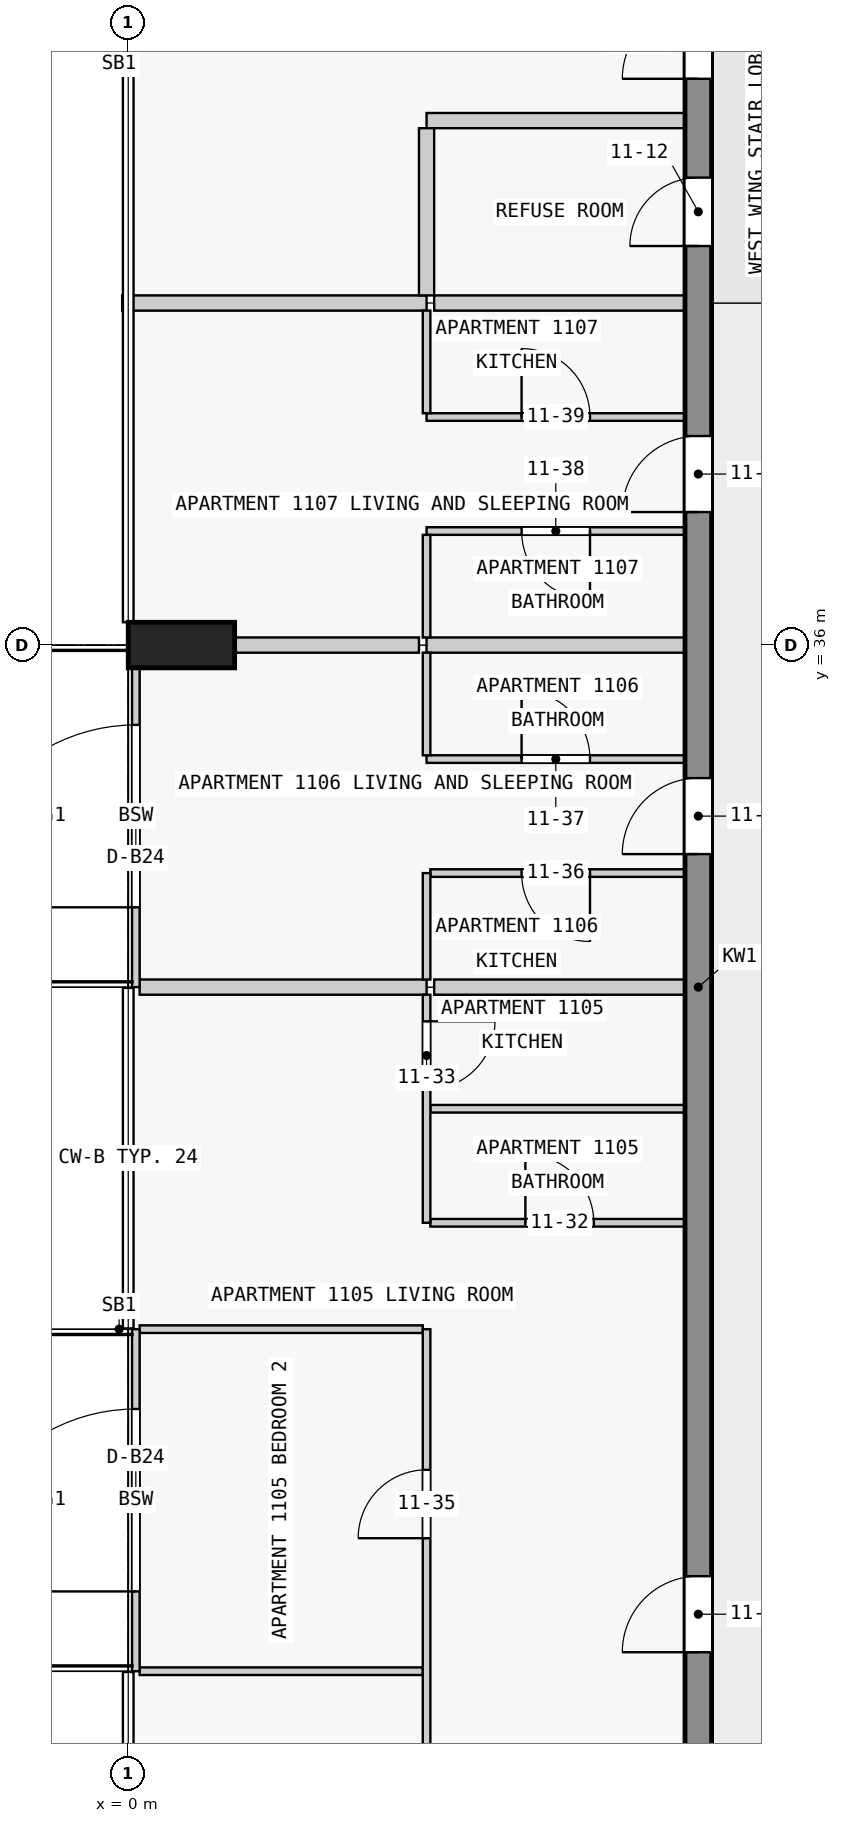
"""IFC4 building model, lengths in metres.
Left out: names, types, materials, properties, quantities, classifications, styles, units other than length and angle.
Written with IfcOpenShell. Run it as: python <this file> out.ifc"""

import sys

from ifc_helpers import new_model, si_unit, direction, frame, frame_2d, origin, origin_2d, place, context, subcontext, project, spatial, rectangle, extrude, element, fill, save


model = new_model("IFC4")
c1 = context("Model", 3, precision=1e-05, world=origin(), true_north=direction((0.0, 1.0)))
c2 = subcontext(c1, "Body", "Model", "MODEL_VIEW")
j1 = project(units=[si_unit("LENGTHUNIT", "METRE"), si_unit("PLANEANGLEUNIT", "RADIAN")], contexts=[c1])
p1 = place(None, origin())
s1 = spatial("IfcSite", under=j1, at=p1, CompositionType="ELEMENT")
p2 = place(p1, origin())
s2 = spatial("IfcBuilding", under=s1, at=p2, CompositionType="ELEMENT")
p3 = place(p2, frame((0.0, 0.0, 47.8)))
s3 = spatial("IfcBuildingStorey", under=s2, at=p3, CompositionType="ELEMENT", Elevation=47.8)
p4 = place(p3, frame((0.7, 36.0, 0.0), z_axis=(0.0, 0.0, 1.0), x_axis=(0.0, 1.0, 0.0)))
e1 = element("IfcColumn", 1, at=p4, inside=s3, PredefinedType="COLUMN", context=c2, shape_type="SweptSolid", body=[
    extrude(rectangle(XDim=0.6, YDim=1.4, at=origin_2d()), origin(), (0.0, 0.0, 1.0), 3.5),
])
p5 = place(p3, frame((7.5, 18.0, 0.0), z_axis=(0.0, 0.0, 1.0), x_axis=(0.0, 1.0, 0.0)))
e2 = element("IfcWall", 2, at=p5, inside=s3, PredefinedType="SHEAR", context=c2, shape_type="SweptSolid", body=[
    extrude(rectangle(XDim=27.0, YDim=0.35, at=frame_2d((13.5, 0.0))), origin(), (0.0, 0.0, 1.0), 3.25),
])
p6 = place(p5, frame((4.75, 0.0, 0.0)))
e3 = element("IfcOpeningElement", 3, at=p6, cuts=e2, PredefinedType="OPENING", context=c2, shape_type="SweptSolid", body=[
    extrude(rectangle(XDim=1.0, YDim=2.1, at=frame_2d((0.5, 1.05))), frame((0.0, 0.185, 0.0), z_axis=(0.0, -1.0, 0.0), x_axis=(1.0, 0.0, 0.0)), (0.0, 0.0, 1.0), 0.37),
])
p7 = place(p5, frame((15.25, 0.0, 0.0)))
e4 = element("IfcOpeningElement", 4, at=p7, cuts=e2, PredefinedType="OPENING", context=c2, shape_type="SweptSolid", body=[
    extrude(rectangle(XDim=1.0, YDim=2.1, at=frame_2d((0.5, 1.05))), frame((0.0, 0.185, 0.0), z_axis=(0.0, -1.0, 0.0), x_axis=(1.0, 0.0, 0.0)), (0.0, 0.0, 1.0), 0.37),
])
p8 = place(p5, frame((19.75, 0.0, 0.0)))
e5 = element("IfcOpeningElement", 5, at=p8, cuts=e2, PredefinedType="OPENING", context=c2, shape_type="SweptSolid", body=[
    extrude(rectangle(XDim=1.0, YDim=2.1, at=frame_2d((0.5, 1.05))), frame((0.0, 0.185, 0.0), z_axis=(0.0, -1.0, 0.0), x_axis=(1.0, 0.0, 0.0)), (0.0, 0.0, 1.0), 0.37),
])
p9 = place(p5, frame((23.25, 0.0, 0.0)))
e6 = element("IfcOpeningElement", 6, at=p9, cuts=e2, PredefinedType="OPENING", context=c2, shape_type="SweptSolid", body=[
    extrude(rectangle(XDim=0.9, YDim=2.1, at=frame_2d((0.45, 1.05))), frame((0.0, 0.185, 0.0), z_axis=(0.0, -1.0, 0.0), x_axis=(1.0, 0.0, 0.0)), (0.0, 0.0, 1.0), 0.37),
])
p10 = place(p5, frame((25.45, 0.0, 0.0)))
e7 = element("IfcOpeningElement", 7, at=p10, cuts=e2, PredefinedType="OPENING", context=c2, shape_type="SweptSolid", body=[
    extrude(rectangle(XDim=1.0, YDim=2.1, at=frame_2d((0.5, 1.05))), frame((0.0, 0.185, 0.0), z_axis=(0.0, -1.0, 0.0), x_axis=(1.0, 0.0, 0.0)), (0.0, 0.0, 1.0), 0.37),
])
p11 = place(p3, frame((0.1, 22.5, 0.0), z_axis=(0.0, 0.0, 1.0), x_axis=(0.0, 1.0, 0.0)))
e8 = element("IfcWall", 8, at=p11, inside=s3, PredefinedType="STANDARD", context=c2, shape_type="SweptSolid", body=[
    extrude(rectangle(XDim=4.5, YDim=0.1, at=frame_2d((2.25, 0.0))), origin(), (0.0, 0.0, 1.0), 3.25),
])
p12 = place(p11, frame((1.05, 0.0, 0.0)))
e9 = element("IfcOpeningElement", 9, at=p12, cuts=e8, PredefinedType="OPENING", context=c2, shape_type="SweptSolid", body=[
    extrude(rectangle(XDim=2.4, YDim=2.4, at=frame_2d((1.2, 1.2))), frame((0.0, 0.06, 0.0), z_axis=(0.0, -1.0, 0.0), x_axis=(1.0, 0.0, 0.0)), (0.0, 0.0, 1.0), 0.12),
])
p13 = place(p3, frame((0.1, 31.5, 0.0), z_axis=(0.0, 0.0, 1.0), x_axis=(0.0, 1.0, 0.0)))
e10 = element("IfcWall", 10, at=p13, inside=s3, PredefinedType="STANDARD", context=c2, shape_type="SweptSolid", body=[
    extrude(rectangle(XDim=4.5, YDim=0.1, at=frame_2d((2.25, 0.0))), origin(), (0.0, 0.0, 1.0), 3.25),
])
p14 = place(p13, frame((1.05, 0.0, 0.0)))
e11 = element("IfcOpeningElement", 11, at=p14, cuts=e10, PredefinedType="OPENING", context=c2, shape_type="SweptSolid", body=[
    extrude(rectangle(XDim=2.4, YDim=2.4, at=frame_2d((1.2, 1.2))), frame((0.0, 0.06, 0.0), z_axis=(0.0, -1.0, 0.0), x_axis=(1.0, 0.0, 0.0)), (0.0, 0.0, 1.0), 0.12),
])
for number, where, z_axis, x_axis in (
    (12, (3.875, 22.5, 0.0), (0.0, 0.0, 1.0), (-1.0, 0.0, 0.0)),
    (13, (3.875, 27.0, 0.0), (0.0, 0.0, 1.0), (-1.0, 0.0, 0.0)),
):
    element("IfcWall", number, at=place(p3, frame(where, z_axis=z_axis, x_axis=x_axis)), inside=s3, PredefinedType="PARTITIONING", context=c2, shape_type="SweptSolid", body=[
        extrude(rectangle(XDim=3.725, YDim=0.1, at=frame_2d((1.863, 0.0))), origin(), (0.0, 0.0, 1.0), 3.25),
    ])
p15 = place(p3, frame((3.975, 28.4, 0.0), z_axis=(0.0, 0.0, 1.0), x_axis=(1.0, 0.0, 0.0)))
e14 = element("IfcWall", 14, at=p15, inside=s3, PredefinedType="PARTITIONING", context=c2, shape_type="SweptSolid", body=[
    extrude(rectangle(XDim=3.35, YDim=0.1, at=frame_2d((1.675, 0.0))), origin(), (0.0, 0.0, 1.0), 3.25),
])
p16 = place(p15, frame((1.25, 0.0, 0.0)))
e15 = element("IfcOpeningElement", 15, at=p16, cuts=e14, PredefinedType="OPENING", context=c2, shape_type="SweptSolid", body=[
    extrude(rectangle(XDim=0.9, YDim=2.1, at=frame_2d((0.45, 1.05))), frame((0.0, 0.06, 0.0), z_axis=(0.0, -1.0, 0.0), x_axis=(1.0, 0.0, 0.0)), (0.0, 0.0, 1.0), 0.12),
])
p17 = place(p3, frame((7.325, 29.9, 0.0), z_axis=(0.0, 0.0, 1.0), x_axis=(-1.0, 0.0, 0.0)))
e16 = element("IfcWall", 16, at=p17, inside=s3, PredefinedType="PARTITIONING", context=c2, shape_type="SweptSolid", body=[
    extrude(rectangle(XDim=3.35, YDim=0.1, at=frame_2d((1.675, 0.0))), origin(), (0.0, 0.0, 1.0), 3.25),
])
p18 = place(p3, frame((7.325, 31.5, 0.0), z_axis=(0.0, 0.0, 1.0), x_axis=(-1.0, 0.0, 0.0)))
e17 = element("IfcWall", 17, at=p18, inside=s3, PredefinedType="PARTITIONING", context=c2, shape_type="SweptSolid", body=[
    extrude(rectangle(XDim=3.3, YDim=0.2, at=frame_2d((1.65, 0.0))), origin(), (0.0, 0.0, 1.0), 3.25),
])
p19 = place(p3, frame((0.15, 31.5, 0.0), z_axis=(0.0, 0.0, 1.0), x_axis=(1.0, 0.0, 0.0)))
e18 = element("IfcWall", 18, at=p19, inside=s3, PredefinedType="PARTITIONING", context=c2, shape_type="SweptSolid", body=[
    extrude(rectangle(XDim=3.775, YDim=0.2, at=frame_2d((1.888, 0.0))), origin(), (0.0, 0.0, 1.0), 3.25),
])
p20 = place(p3, frame((7.325, 33.0, 0.0), z_axis=(0.0, 0.0, 1.0), x_axis=(-1.0, 0.0, 0.0)))
e19 = element("IfcWall", 19, at=p20, inside=s3, PredefinedType="PARTITIONING", context=c2, shape_type="SweptSolid", body=[
    extrude(rectangle(XDim=3.35, YDim=0.1, at=frame_2d((1.675, 0.0))), origin(), (0.0, 0.0, 1.0), 3.25),
])
p21 = place(p20, frame((1.25, 0.0, 0.0)))
e20 = element("IfcOpeningElement", 20, at=p21, cuts=e19, PredefinedType="OPENING", context=c2, shape_type="SweptSolid", body=[
    extrude(rectangle(XDim=0.9, YDim=2.1, at=frame_2d((0.45, 1.05))), frame((0.0, 0.06, 0.0), z_axis=(0.0, -1.0, 0.0), x_axis=(1.0, 0.0, 0.0)), (0.0, 0.0, 1.0), 0.12),
])
p22 = place(p3, frame((3.925, 34.5, 0.0), z_axis=(0.0, 0.0, 1.0), x_axis=(1.0, 0.0, 0.0)))
e21 = element("IfcWall", 21, at=p22, inside=s3, PredefinedType="PARTITIONING", context=c2, shape_type="SweptSolid", body=[
    extrude(rectangle(XDim=3.4, YDim=0.1, at=frame_2d((1.7, 0.0))), origin(), (0.0, 0.0, 1.0), 3.25),
])
p23 = place(p22, frame((1.25, 0.0, 0.0)))
e22 = element("IfcOpeningElement", 22, at=p23, cuts=e21, PredefinedType="OPENING", context=c2, shape_type="SweptSolid", body=[
    extrude(rectangle(XDim=0.9, YDim=2.1, at=frame_2d((0.45, 1.05))), frame((0.0, 0.06, 0.0), z_axis=(0.0, -1.0, 0.0), x_axis=(1.0, 0.0, 0.0)), (0.0, 0.0, 1.0), 0.12),
])
p24 = place(p3, frame((7.325, 36.0, 0.0), z_axis=(0.0, 0.0, 1.0), x_axis=(-1.0, 0.0, 0.0)))
e23 = element("IfcWall", 23, at=p24, inside=s3, PredefinedType="PARTITIONING", context=c2, shape_type="SweptSolid", body=[
    extrude(rectangle(XDim=3.4, YDim=0.2, at=frame_2d((1.7, 0.0))), origin(), (0.0, 0.0, 1.0), 3.25),
])
p25 = place(p3, frame((1.4, 36.0, 0.0), z_axis=(0.0, 0.0, 1.0), x_axis=(1.0, 0.0, 0.0)))
e24 = element("IfcWall", 24, at=p25, inside=s3, PredefinedType="PARTITIONING", context=c2, shape_type="SweptSolid", body=[
    extrude(rectangle(XDim=2.425, YDim=0.2, at=frame_2d((1.212, 0.0))), origin(), (0.0, 0.0, 1.0), 3.25),
])
p26 = place(p3, frame((7.325, 37.5, 0.0), z_axis=(0.0, 0.0, 1.0), x_axis=(-1.0, 0.0, 0.0)))
e25 = element("IfcWall", 25, at=p26, inside=s3, PredefinedType="PARTITIONING", context=c2, shape_type="SweptSolid", body=[
    extrude(rectangle(XDim=3.4, YDim=0.1, at=frame_2d((1.7, 0.0))), origin(), (0.0, 0.0, 1.0), 3.25),
])
p27 = place(p26, frame((1.25, 0.0, 0.0)))
e26 = element("IfcOpeningElement", 26, at=p27, cuts=e25, PredefinedType="OPENING", context=c2, shape_type="SweptSolid", body=[
    extrude(rectangle(XDim=0.9, YDim=2.1, at=frame_2d((0.45, 1.05))), frame((0.0, 0.06, 0.0), z_axis=(0.0, -1.0, 0.0), x_axis=(1.0, 0.0, 0.0)), (0.0, 0.0, 1.0), 0.12),
])
p28 = place(p3, frame((3.925, 39.0, 0.0), z_axis=(0.0, 0.0, 1.0), x_axis=(1.0, 0.0, 0.0)))
e27 = element("IfcWall", 27, at=p28, inside=s3, PredefinedType="PARTITIONING", context=c2, shape_type="SweptSolid", body=[
    extrude(rectangle(XDim=3.4, YDim=0.1, at=frame_2d((1.7, 0.0))), origin(), (0.0, 0.0, 1.0), 3.25),
])
p29 = place(p28, frame((1.25, 0.0, 0.0)))
e28 = element("IfcOpeningElement", 28, at=p29, cuts=e27, PredefinedType="OPENING", context=c2, shape_type="SweptSolid", body=[
    extrude(rectangle(XDim=0.9, YDim=2.1, at=frame_2d((0.45, 1.05))), frame((0.0, 0.06, 0.0), z_axis=(0.0, -1.0, 0.0), x_axis=(1.0, 0.0, 0.0)), (0.0, 0.0, 1.0), 0.12),
])
p30 = place(p3, frame((7.325, 40.5, 0.0), z_axis=(0.0, 0.0, 1.0), x_axis=(-1.0, 0.0, 0.0)))
e29 = element("IfcWall", 29, at=p30, inside=s3, PredefinedType="PARTITIONING", context=c2, shape_type="SweptSolid", body=[
    extrude(rectangle(XDim=3.3, YDim=0.2, at=frame_2d((1.65, 0.0))), origin(), (0.0, 0.0, 1.0), 3.25),
])
p31 = place(p3, frame((-0.08, 40.5, 0.0), z_axis=(0.0, 0.0, 1.0), x_axis=(1.0, 0.0, 0.0)))
e30 = element("IfcWall", 30, at=p31, inside=s3, PredefinedType="PARTITIONING", context=c2, shape_type="SweptSolid", body=[
    extrude(rectangle(XDim=4.005, YDim=0.2, at=frame_2d((2.002, 0.0))), origin(), (0.0, 0.0, 1.0), 3.25),
])
p32 = place(p3, frame((7.325, 42.9, 0.0), z_axis=(0.0, 0.0, 1.0), x_axis=(-1.0, 0.0, 0.0)))
e31 = element("IfcWall", 31, at=p32, inside=s3, PredefinedType="PARTITIONING", context=c2, shape_type="SweptSolid", body=[
    extrude(rectangle(XDim=3.4, YDim=0.2, at=frame_2d((1.7, 0.0))), origin(), (0.0, 0.0, 1.0), 3.25),
])
p33 = place(p3, frame((3.925, 31.4, 0.0), z_axis=(0.0, 0.0, 1.0), x_axis=(0.0, -1.0, 0.0)))
e32 = element("IfcWall", 32, at=p33, inside=s3, PredefinedType="PARTITIONING", context=c2, shape_type="SweptSolid", body=[
    extrude(rectangle(XDim=3.0, YDim=0.1, at=frame_2d((1.5, 0.0))), origin(), (0.0, 0.0, 1.0), 3.25),
])
p34 = place(p33, frame((0.35, 0.0, 0.0)))
e33 = element("IfcOpeningElement", 33, at=p34, cuts=e32, PredefinedType="OPENING", context=c2, shape_type="SweptSolid", body=[
    extrude(rectangle(XDim=0.9, YDim=2.1, at=frame_2d((0.45, 1.05))), frame((0.0, 0.06, 0.0), z_axis=(0.0, -1.0, 0.0), x_axis=(1.0, 0.0, 0.0)), (0.0, 0.0, 1.0), 0.12),
])
p35 = place(p3, frame((3.925, 33.0, 0.0), z_axis=(0.0, 0.0, 1.0), x_axis=(0.0, -1.0, 0.0)))
e34 = element("IfcWall", 34, at=p35, inside=s3, PredefinedType="PARTITIONING", context=c2, shape_type="SweptSolid", body=[
    extrude(rectangle(XDim=1.4, YDim=0.1, at=frame_2d((0.7, 0.0))), origin(), (0.0, 0.0, 1.0), 3.25),
])
for number, where, z_axis, x_axis in (
    (35, (3.925, 35.9, 0.0), (0.0, 0.0, 1.0), (0.0, -1.0, 0.0)),
    (36, (3.925, 37.45, 0.0), (0.0, 0.0, 1.0), (0.0, -1.0, 0.0)),
    (37, (3.925, 40.4, 0.0), (0.0, 0.0, 1.0), (0.0, -1.0, 0.0)),
):
    element("IfcWall", number, at=place(p3, frame(where, z_axis=z_axis, x_axis=x_axis)), inside=s3, PredefinedType="PARTITIONING", context=c2, shape_type="SweptSolid", body=[
        extrude(rectangle(XDim=1.35, YDim=0.1, at=frame_2d((0.675, 0.0))), origin(), (0.0, 0.0, 1.0), 3.25),
    ])
p36 = place(p3, frame((3.925, 18.0, 0.0), z_axis=(0.0, 0.0, 1.0), x_axis=(0.0, 1.0, 0.0)))
e38 = element("IfcWall", 38, at=p36, inside=s3, PredefinedType="PARTITIONING", context=c2, shape_type="SweptSolid", body=[
    extrude(rectangle(XDim=9.0, YDim=0.1, at=frame_2d((4.5, 0.0))), origin(), (0.0, 0.0, 1.0), 3.25),
])
p37 = place(p36, frame((1.85, 0.0, 0.0)))
e39 = element("IfcOpeningElement", 39, at=p37, cuts=e38, PredefinedType="OPENING", context=c2, shape_type="SweptSolid", body=[
    extrude(rectangle(XDim=0.9, YDim=2.1, at=frame_2d((0.45, 1.05))), frame((0.0, 0.06, 0.0), z_axis=(0.0, -1.0, 0.0), x_axis=(1.0, 0.0, 0.0)), (0.0, 0.0, 1.0), 0.12),
])
p38 = place(p36, frame((6.25, 0.0, 0.0)))
e40 = element("IfcOpeningElement", 40, at=p38, cuts=e38, PredefinedType="OPENING", context=c2, shape_type="SweptSolid", body=[
    extrude(rectangle(XDim=0.9, YDim=2.1, at=frame_2d((0.45, 1.05))), frame((0.0, 0.06, 0.0), z_axis=(0.0, -1.0, 0.0), x_axis=(1.0, 0.0, 0.0)), (0.0, 0.0, 1.0), 0.12),
])
p39 = place(p3, frame((3.925, 42.8, 0.0), z_axis=(0.0, 0.0, 1.0), x_axis=(0.0, -1.0, 0.0)))
e41 = element("IfcWall", 41, at=p39, inside=s3, PredefinedType="PARTITIONING", context=c2, shape_type="SweptSolid", body=[
    extrude(rectangle(XDim=2.2, YDim=0.2, at=frame_2d((1.1, 0.0))), origin(), (0.0, 0.0, 1.0), 3.25),
])
p40 = place(p12, origin())
e42 = element("IfcDoor", 42, at=p40, inside=s3, OperationType="SINGLE_SWING_LEFT", PredefinedType="DOOR", context=c2, shape_type="SweptSolid", body=[
    extrude(rectangle(XDim=2.4, YDim=2.4, at=frame_2d((1.2, 1.2))), frame((0.0, 0.025, 0.0), z_axis=(0.0, -1.0, 0.0), x_axis=(1.0, 0.0, 0.0)), (0.0, 0.0, 1.0), 0.05),
])
fill(e9, e42)
p41 = place(p14, origin())
e43 = element("IfcDoor", 43, at=p41, inside=s3, OperationType="SINGLE_SWING_LEFT", PredefinedType="DOOR", context=c2, shape_type="SweptSolid", body=[
    extrude(rectangle(XDim=2.4, YDim=2.4, at=frame_2d((1.2, 1.2))), frame((0.0, 0.025, 0.0), z_axis=(0.0, -1.0, 0.0), x_axis=(1.0, 0.0, 0.0)), (0.0, 0.0, 1.0), 0.05),
])
fill(e11, e43)
p42 = place(p6, origin())
e44 = element("IfcDoor", 44, at=p42, inside=s3, OperationType="SINGLE_SWING_LEFT", PredefinedType="DOOR", context=c2, shape_type="SweptSolid", body=[
    extrude(rectangle(XDim=1.0, YDim=2.1, at=frame_2d((0.5, 1.05))), frame((0.0, 0.025, 0.0), z_axis=(0.0, -1.0, 0.0), x_axis=(1.0, 0.0, 0.0)), (0.0, 0.0, 1.0), 0.05),
])
fill(e3, e44)
p43 = place(p7, origin())
e45 = element("IfcDoor", 45, at=p43, inside=s3, OperationType="SINGLE_SWING_RIGHT", PredefinedType="DOOR", context=c2, shape_type="SweptSolid", body=[
    extrude(rectangle(XDim=1.0, YDim=2.1, at=frame_2d((0.5, 1.05))), frame((0.0, 0.025, 0.0), z_axis=(0.0, -1.0, 0.0), x_axis=(1.0, 0.0, 0.0)), (0.0, 0.0, 1.0), 0.05),
])
fill(e4, e45)
p44 = place(p8, origin())
e46 = element("IfcDoor", 46, at=p44, inside=s3, OperationType="SINGLE_SWING_RIGHT", PredefinedType="DOOR", context=c2, shape_type="SweptSolid", body=[
    extrude(rectangle(XDim=1.0, YDim=2.1, at=frame_2d((0.5, 1.05))), frame((0.0, 0.025, 0.0), z_axis=(0.0, -1.0, 0.0), x_axis=(1.0, 0.0, 0.0)), (0.0, 0.0, 1.0), 0.05),
])
fill(e5, e46)
p45 = place(p9, origin())
e47 = element("IfcDoor", 47, at=p45, inside=s3, OperationType="SINGLE_SWING_RIGHT", PredefinedType="DOOR", context=c2, shape_type="SweptSolid", body=[
    extrude(rectangle(XDim=0.9, YDim=2.1, at=frame_2d((0.45, 1.05))), frame((0.0, 0.025, 0.0), z_axis=(0.0, -1.0, 0.0), x_axis=(1.0, 0.0, 0.0)), (0.0, 0.0, 1.0), 0.05),
])
fill(e6, e47)
p46 = place(p10, origin())
e48 = element("IfcDoor", 48, at=p46, inside=s3, OperationType="SINGLE_SWING_RIGHT", PredefinedType="DOOR", context=c2, shape_type="SweptSolid", body=[
    extrude(rectangle(XDim=1.0, YDim=2.1, at=frame_2d((0.5, 1.05))), frame((0.0, 0.025, 0.0), z_axis=(0.0, -1.0, 0.0), x_axis=(1.0, 0.0, 0.0)), (0.0, 0.0, 1.0), 0.05),
])
fill(e7, e48)
p47 = place(p16, origin())
e49 = element("IfcDoor", 49, at=p47, inside=s3, OperationType="SINGLE_SWING_RIGHT", PredefinedType="DOOR", context=c2, shape_type="SweptSolid", body=[
    extrude(rectangle(XDim=0.9, YDim=2.1, at=frame_2d((0.45, 1.05))), frame((0.0, 0.025, 0.0), z_axis=(0.0, -1.0, 0.0), x_axis=(1.0, 0.0, 0.0)), (0.0, 0.0, 1.0), 0.05),
])
fill(e15, e49)
p48 = place(p34, origin())
e50 = element("IfcDoor", 50, at=p48, inside=s3, OperationType="SINGLE_SWING_LEFT", PredefinedType="DOOR", context=c2, shape_type="SweptSolid", body=[
    extrude(rectangle(XDim=0.9, YDim=2.1, at=frame_2d((0.45, 1.05))), frame((0.0, 0.025, 0.0), z_axis=(0.0, -1.0, 0.0), x_axis=(1.0, 0.0, 0.0)), (0.0, 0.0, 1.0), 0.05),
])
fill(e33, e50)
p49 = place(p38, origin())
e51 = element("IfcDoor", 51, at=p49, inside=s3, OperationType="SINGLE_SWING_RIGHT", PredefinedType="DOOR", context=c2, shape_type="SweptSolid", body=[
    extrude(rectangle(XDim=0.9, YDim=2.1, at=frame_2d((0.45, 1.05))), frame((0.0, 0.025, 0.0), z_axis=(0.0, -1.0, 0.0), x_axis=(1.0, 0.0, 0.0)), (0.0, 0.0, 1.0), 0.05),
])
fill(e40, e51)
p50 = place(p21, origin())
e52 = element("IfcDoor", 52, at=p50, inside=s3, OperationType="SINGLE_SWING_RIGHT", PredefinedType="DOOR", context=c2, shape_type="SweptSolid", body=[
    extrude(rectangle(XDim=0.9, YDim=2.1, at=frame_2d((0.45, 1.05))), frame((0.0, 0.025, 0.0), z_axis=(0.0, -1.0, 0.0), x_axis=(1.0, 0.0, 0.0)), (0.0, 0.0, 1.0), 0.05),
])
fill(e20, e52)
p51 = place(p23, origin())
e53 = element("IfcDoor", 53, at=p51, inside=s3, OperationType="SINGLE_SWING_LEFT", PredefinedType="DOOR", context=c2, shape_type="SweptSolid", body=[
    extrude(rectangle(XDim=0.9, YDim=2.1, at=frame_2d((0.45, 1.05))), frame((0.0, 0.025, 0.0), z_axis=(0.0, -1.0, 0.0), x_axis=(1.0, 0.0, 0.0)), (0.0, 0.0, 1.0), 0.05),
])
fill(e22, e53)
p52 = place(p27, origin())
e54 = element("IfcDoor", 54, at=p52, inside=s3, OperationType="SINGLE_SWING_LEFT", PredefinedType="DOOR", context=c2, shape_type="SweptSolid", body=[
    extrude(rectangle(XDim=0.9, YDim=2.1, at=frame_2d((0.45, 1.05))), frame((0.0, 0.025, 0.0), z_axis=(0.0, -1.0, 0.0), x_axis=(1.0, 0.0, 0.0)), (0.0, 0.0, 1.0), 0.05),
])
fill(e26, e54)
p53 = place(p29, origin())
e55 = element("IfcDoor", 55, at=p53, inside=s3, OperationType="SINGLE_SWING_LEFT", PredefinedType="DOOR", context=c2, shape_type="SweptSolid", body=[
    extrude(rectangle(XDim=0.9, YDim=2.1, at=frame_2d((0.45, 1.05))), frame((0.0, 0.025, 0.0), z_axis=(0.0, -1.0, 0.0), x_axis=(1.0, 0.0, 0.0)), (0.0, 0.0, 1.0), 0.05),
])
fill(e28, e55)
save(model, sys.argv[1])
